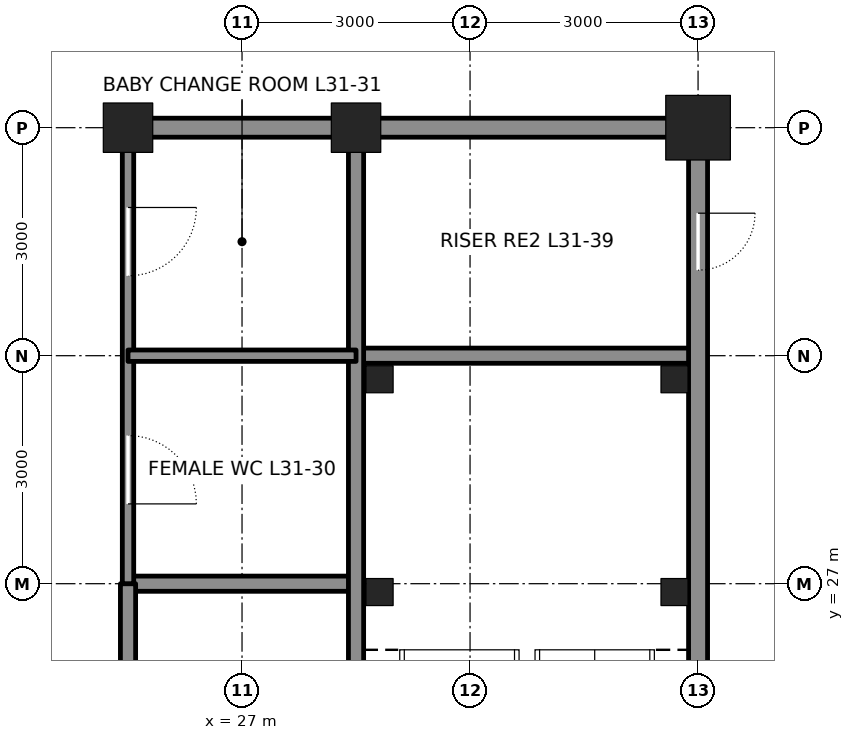
"""IFC4 building model, lengths in metres.
Left out: names, types, materials, properties, quantities, classifications, styles, units other than length and angle.
Written with IfcOpenShell. Run it as: python <this file> out.ifc"""

import sys

from ifc_helpers import new_model, si_unit, direction, frame, frame_2d, origin, origin_2d, place, context, subcontext, project, spatial, rectangle, hollow_rectangle, extrude, element, fill, save


model = new_model("IFC4")
c1 = context("Model", 3, precision=1e-05, world=origin(), true_north=direction((0.0, 1.0)))
c2 = subcontext(c1, "Body", "Model", "MODEL_VIEW")
j1 = project(units=[si_unit("LENGTHUNIT", "METRE"), si_unit("PLANEANGLEUNIT", "RADIAN")], contexts=[c1])
p1 = place(None, origin())
s1 = spatial("IfcSite", under=j1, at=p1, CompositionType="ELEMENT")
p2 = place(p1, origin())
s2 = spatial("IfcBuilding", under=s1, at=p2, CompositionType="ELEMENT")
p3 = place(p2, frame((0.0, 0.0, 144.6)))
s3 = spatial("IfcBuildingStorey", under=s2, at=p3, CompositionType="ELEMENT", Elevation=144.6)
for number, where, z_axis, x_axis in (
    (1, (25.5, 33.0, 0.0), (0.0, 0.0, 1.0), (1.0, 0.0, 0.0)),
    (2, (28.5, 33.0, 0.0), (0.0, 0.0, 1.0), (1.0, 0.0, 0.0)),
):
    element("IfcColumn", number, at=place(p3, frame(where, z_axis=z_axis, x_axis=x_axis)), inside=s3, PredefinedType="COLUMN", context=c2, shape_type="SweptSolid", body=[
        extrude(hollow_rectangle(XDim=0.65, YDim=0.65, WallThickness=0.065, at=origin_2d()), origin(), (0.0, 0.0, 1.0), 4.2),
    ])
p4 = place(p3, frame((33.0, 33.0, 0.0), z_axis=(0.0, 0.0, 1.0), x_axis=(1.0, 0.0, 0.0)))
e3 = element("IfcColumn", 3, at=p4, inside=s3, PredefinedType="COLUMN", context=c2, shape_type="SweptSolid", body=[
    extrude(hollow_rectangle(XDim=0.85, YDim=0.85, WallThickness=0.085, at=origin_2d()), origin(), (0.0, 0.0, 1.0), 4.2),
])
p5 = place(p3, frame((25.5, 27.0, 0.0), z_axis=(0.0, 0.0, 1.0), x_axis=(1.0, 0.0, 0.0)))
e4 = element("IfcWall", 4, at=p5, inside=s3, PredefinedType="SOLIDWALL", context=c2, shape_type="SweptSolid", body=[
    extrude(rectangle(XDim=3.0, YDim=0.2, at=frame_2d((1.5, 0.0))), origin(), (0.0, 0.0, 1.0), 4.04),
])
p6 = place(p3, frame((28.5, 30.0, 0.0), z_axis=(0.0, 0.0, 1.0), x_axis=(1.0, 0.0, 0.0)))
e5 = element("IfcWall", 5, at=p6, inside=s3, PredefinedType="SOLIDWALL", context=c2, shape_type="SweptSolid", body=[
    extrude(rectangle(XDim=4.5, YDim=0.2, at=frame_2d((2.25, 0.0))), origin(), (0.0, 0.0, 1.0), 4.04),
])
p7 = place(p3, frame((25.75, 33.0, 0.0), z_axis=(0.0, 0.0, 1.0), x_axis=(1.0, 0.0, 0.0)))
e6 = element("IfcWall", 6, at=p7, inside=s3, PredefinedType="SOLIDWALL", context=c2, shape_type="SweptSolid", body=[
    extrude(rectangle(XDim=2.5, YDim=0.25, at=frame_2d((1.25, 0.0))), origin(), (0.0, 0.0, 1.0), 3.181),
])
p8 = place(p3, frame((28.75, 33.0, 0.0), z_axis=(0.0, 0.0, 1.0), x_axis=(1.0, 0.0, 0.0)))
e7 = element("IfcWall", 7, at=p8, inside=s3, PredefinedType="SOLIDWALL", context=c2, shape_type="SweptSolid", body=[
    extrude(rectangle(XDim=4.0, YDim=0.25, at=frame_2d((2.0, 0.0))), origin(), (0.0, 0.0, 1.0), 3.181),
])
p9 = place(p3, frame((25.5, 15.0, 0.0), z_axis=(0.0, 0.0, 1.0), x_axis=(0.0, 1.0, 0.0)))
e8 = element("IfcWall", 8, at=p9, inside=s3, PredefinedType="SOLIDWALL", context=c2, shape_type="SweptSolid", body=[
    extrude(rectangle(XDim=12.0, YDim=0.2, at=frame_2d((6.0, 0.0))), origin(), (0.0, 0.0, 1.0), 3.064),
])
p10 = place(p3, frame((25.5, 27.0, 0.0), z_axis=(0.0, 0.0, 1.0), x_axis=(0.0, 1.0, 0.0)))
e9 = element("IfcWall", 9, at=p10, inside=s3, PredefinedType="PARTITIONING", context=c2, shape_type="SweptSolid", body=[
    extrude(rectangle(XDim=5.75, YDim=0.15, at=frame_2d((2.875, 0.0))), origin(), (0.0, 0.0, 1.0), 3.064),
])
p11 = place(p10, frame((1.05, 0.0, 0.0)))
e10 = element("IfcOpeningElement", 10, at=p11, cuts=e9, PredefinedType="OPENING", context=c2, shape_type="SweptSolid", body=[
    extrude(rectangle(XDim=0.9, YDim=2.1, at=frame_2d((0.45, 1.05))), frame((0.0, 0.085, 0.0), z_axis=(0.0, -1.0, 0.0), x_axis=(1.0, 0.0, 0.0)), (0.0, 0.0, 1.0), 0.17),
])
p12 = place(p10, frame((4.05, 0.0, 0.0)))
e11 = element("IfcOpeningElement", 11, at=p12, cuts=e9, PredefinedType="OPENING", context=c2, shape_type="SweptSolid", body=[
    extrude(rectangle(XDim=0.9, YDim=2.1, at=frame_2d((0.45, 1.05))), frame((0.0, 0.085, 0.0), z_axis=(0.0, -1.0, 0.0), x_axis=(1.0, 0.0, 0.0)), (0.0, 0.0, 1.0), 0.17),
])
p13 = place(p3, frame((28.5, 24.25, 0.0), z_axis=(0.0, 0.0, 1.0), x_axis=(0.0, 1.0, 0.0)))
e12 = element("IfcWall", 12, at=p13, inside=s3, PredefinedType="SOLIDWALL", context=c2, shape_type="SweptSolid", body=[
    extrude(rectangle(XDim=8.5, YDim=0.2, at=frame_2d((4.25, 0.0))), origin(), (0.0, 0.0, 1.0), 3.113),
])
p14 = place(p3, frame((33.0, 24.25, 0.0), z_axis=(0.0, 0.0, 1.0), x_axis=(0.0, 1.0, 0.0)))
e13 = element("IfcWall", 13, at=p14, inside=s3, PredefinedType="SOLIDWALL", context=c2, shape_type="SweptSolid", body=[
    extrude(rectangle(XDim=8.5, YDim=0.25, at=frame_2d((4.25, 0.0))), origin(), (0.0, 0.0, 1.0), 3.113),
])
p15 = place(p14, frame((6.875, 0.0, 0.0)))
e14 = element("IfcOpeningElement", 14, at=p15, cuts=e13, PredefinedType="OPENING", context=c2, shape_type="SweptSolid", body=[
    extrude(rectangle(XDim=0.75, YDim=2.1, at=frame_2d((0.375, 1.05))), frame((0.0, 0.135, 0.0), z_axis=(0.0, -1.0, 0.0), x_axis=(1.0, 0.0, 0.0)), (0.0, 0.0, 1.0), 0.27),
])
p16 = place(p3, frame((25.5, 30.0, 0.0), z_axis=(0.0, 0.0, 1.0), x_axis=(1.0, 0.0, 0.0)))
e15 = element("IfcWall", 15, at=p16, inside=s3, PredefinedType="PARTITIONING", context=c2, shape_type="SweptSolid", body=[
    extrude(rectangle(XDim=3.0, YDim=0.15, at=frame_2d((1.5, 0.0))), origin(), (0.0, 0.0, 1.0), 4.04),
])
for number, where, z_axis, x_axis in (
    (16, (28.81, 29.69, 0.0), (0.0, 0.0, 1.0), (1.0, 0.0, 0.0)),
    (17, (32.69, 29.69, 0.0), (0.0, 0.0, 1.0), (1.0, 0.0, 0.0)),
    (18, (28.81, 26.89, 0.0), (0.0, 0.0, 1.0), (1.0, 0.0, 0.0)),
    (19, (32.69, 26.89, 0.0), (0.0, 0.0, 1.0), (1.0, 0.0, 0.0)),
):
    element("IfcColumn", number, at=place(p3, frame(where, z_axis=z_axis, x_axis=x_axis)), inside=s3, PredefinedType="COLUMN", context=c2, shape_type="SweptSolid", body=[
        extrude(hollow_rectangle(XDim=0.356, YDim=0.356, WallThickness=0.015, at=origin_2d()), origin(), (0.0, 0.0, 1.0), 4.2),
    ])
p17 = place(p15, frame((0.75, 0.0, 0.0), z_axis=(0.0, 0.0, 1.0), x_axis=(-1.0, 0.0, 0.0)))
e20 = element("IfcDoor", 20, at=p17, inside=s3, OperationType="SINGLE_SWING_LEFT", PredefinedType="DOOR", context=c2, shape_type="SweptSolid", body=[
    extrude(rectangle(XDim=0.75, YDim=2.1, at=frame_2d((0.375, 1.05))), frame((0.0, 0.025, 0.0), z_axis=(0.0, -1.0, 0.0), x_axis=(1.0, 0.0, 0.0)), (0.0, 0.0, 1.0), 0.05),
])
fill(e14, e20)
p18 = place(p11, frame((0.9, 0.0, 0.0), z_axis=(0.0, 0.0, 1.0), x_axis=(-1.0, 0.0, 0.0)))
e21 = element("IfcDoor", 21, at=p18, inside=s3, OperationType="SINGLE_SWING_RIGHT", PredefinedType="DOOR", context=c2, shape_type="SweptSolid", body=[
    extrude(rectangle(XDim=0.9, YDim=2.1, at=frame_2d((0.45, 1.05))), frame((0.0, 0.025, 0.0), z_axis=(0.0, -1.0, 0.0), x_axis=(1.0, 0.0, 0.0)), (0.0, 0.0, 1.0), 0.05),
])
fill(e10, e21)
p19 = place(p12, frame((0.9, 0.0, 0.0), z_axis=(0.0, 0.0, 1.0), x_axis=(-1.0, 0.0, 0.0)))
e22 = element("IfcDoor", 22, at=p19, inside=s3, OperationType="SINGLE_SWING_LEFT", PredefinedType="DOOR", context=c2, shape_type="SweptSolid", body=[
    extrude(rectangle(XDim=0.9, YDim=2.1, at=frame_2d((0.45, 1.05))), frame((0.0, 0.025, 0.0), z_axis=(0.0, -1.0, 0.0), x_axis=(1.0, 0.0, 0.0)), (0.0, 0.0, 1.0), 0.05),
])
fill(e11, e22)
save(model, sys.argv[1])
